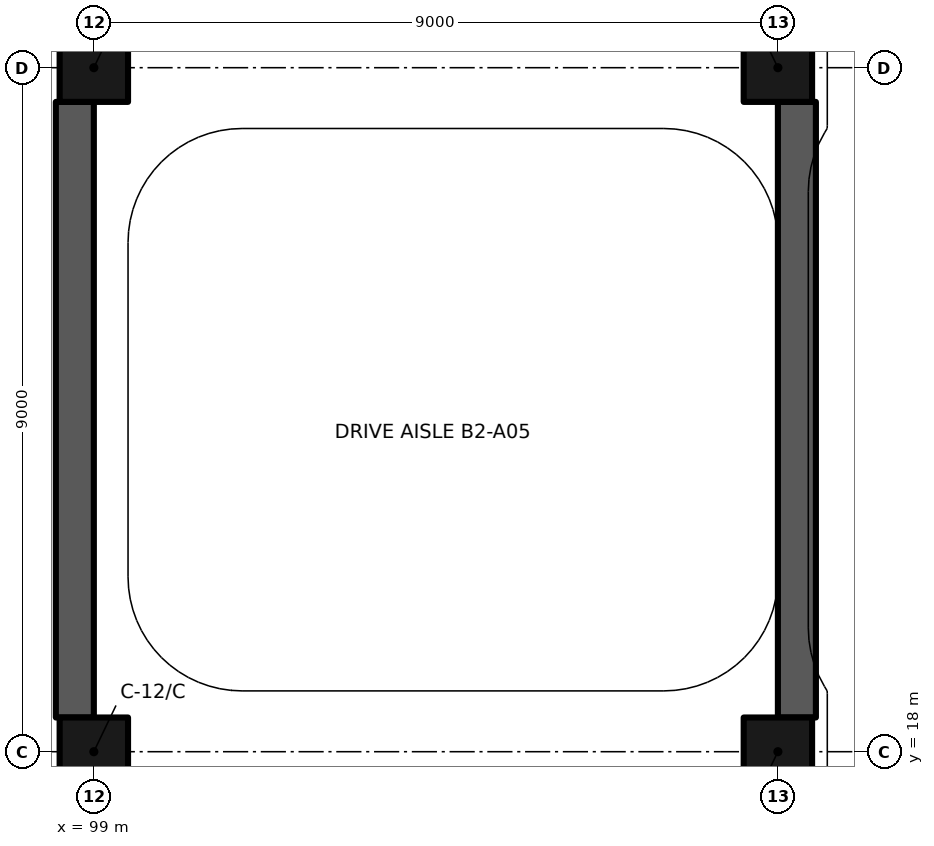
"""IFC4 building model, lengths in metres.
Left out: names, types, materials, properties, quantities, classifications, styles, units other than length and angle.
Written with IfcOpenShell. Run it as: python <this file> out.ifc"""

import sys

from ifc_helpers import new_model, si_unit, direction, frame, frame_2d, origin, origin_2d, place, context, subcontext, project, spatial, rectangle, extrude, element, save


model = new_model("IFC4")
c1 = context("Model", 3, precision=1e-05, world=origin(), true_north=direction((0.0, 1.0)))
c2 = subcontext(c1, "Body", "Model", "MODEL_VIEW")
j1 = project(units=[si_unit("LENGTHUNIT", "METRE"), si_unit("PLANEANGLEUNIT", "RADIAN")], contexts=[c1])
p1 = place(None, origin())
s1 = spatial("IfcSite", under=j1, at=p1, CompositionType="ELEMENT")
p2 = place(p1, origin())
s2 = spatial("IfcBuilding", under=s1, at=p2, CompositionType="ELEMENT")
p3 = place(p2, frame((0.0, 0.0, -9.9)))
s3 = spatial("IfcBuildingStorey", under=s2, at=p3, CompositionType="ELEMENT", Elevation=-9.9)
for number, where, z_axis, x_axis in (
    (1, (98.75, 18.45, -0.5), (0.0, 0.0, 1.0), (0.0, 1.0, 0.0)),
    (2, (108.25, 18.45, -0.5), (0.0, 0.0, 1.0), (0.0, 1.0, 0.0)),
):
    element("IfcWall", number, at=place(p3, frame(where, z_axis=z_axis, x_axis=x_axis)), inside=s3, PredefinedType="SOLIDWALL", context=c2, shape_type="SweptSolid", body=[
        extrude(rectangle(XDim=8.1, YDim=0.5, at=frame_2d((4.05, 0.0))), origin(), (0.0, 0.0, 1.0), 5.3),
    ])
for number, where, z_axis, x_axis in (
    (3, (99.0, 18.0, 0.0), (0.0, 0.0, 1.0), (1.0, 0.0, 0.0)),
    (4, (108.0, 18.0, 0.0), (0.0, 0.0, 1.0), (1.0, 0.0, 0.0)),
    (5, (99.0, 27.0, 0.0), (0.0, 0.0, 1.0), (1.0, 0.0, 0.0)),
    (6, (108.0, 27.0, 0.0), (0.0, 0.0, 1.0), (1.0, 0.0, 0.0)),
):
    element("IfcColumn", number, at=place(p3, frame(where, z_axis=z_axis, x_axis=x_axis)), inside=s3, PredefinedType="COLUMN", context=c2, shape_type="SweptSolid", body=[
        extrude(rectangle(XDim=0.9, YDim=0.9, at=origin_2d()), origin(), (0.0, 0.0, 1.0), 4.8),
    ])
save(model, sys.argv[1])
